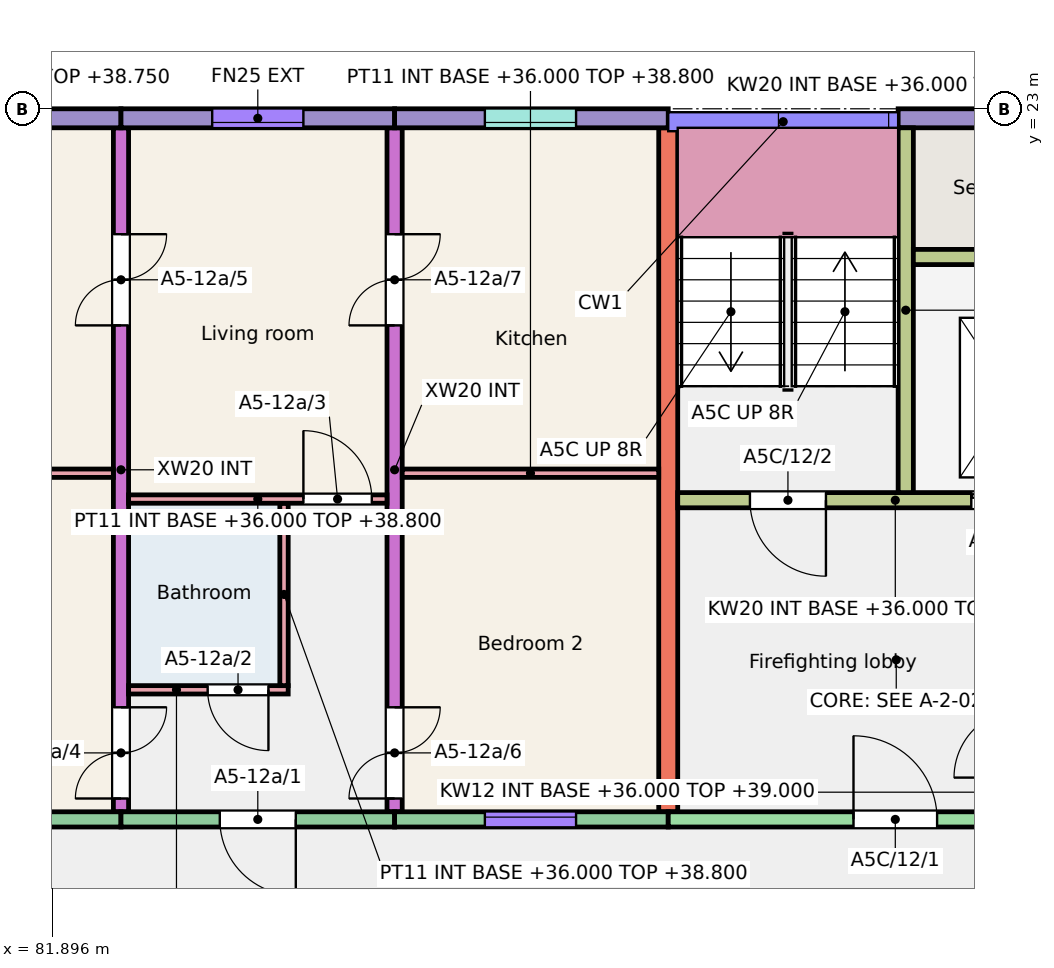
"""IFC4 building model, lengths in metres.
Left out: names, types, materials, properties, quantities, classifications, styles, units other than length and angle.
Written with IfcOpenShell. Run it as: python <this file> out.ifc"""

import sys

from ifc_helpers import new_model, si_unit, direction, frame, frame_2d, origin, place, context, subcontext, project, spatial, rectangle, extrude, element, fill, save


model = new_model("IFC4")
c1 = context("Model", 3, precision=1e-05, world=origin(), true_north=direction((0.0, 1.0)))
c2 = subcontext(c1, "Body", "Model", "MODEL_VIEW")
j1 = project(units=[si_unit("LENGTHUNIT", "METRE"), si_unit("PLANEANGLEUNIT", "RADIAN")], contexts=[c1])
p1 = place(None, origin())
s1 = spatial("IfcSite", under=j1, at=p1, CompositionType="ELEMENT")
p2 = place(p1, origin())
s2 = spatial("IfcBuilding", under=s1, at=p2, CompositionType="ELEMENT")
p3 = place(p2, frame((0.0, 0.0, 36.0)))
s3 = spatial("IfcBuildingStorey", under=s2, at=p3, CompositionType="ELEMENT", Elevation=36.0)
p4 = place(p3, frame((82.8, 13.75, 0.0), z_axis=(0.0, 0.0, 1.0), x_axis=(0.0, 1.0, 0.0)))
e1 = element("IfcWall", 1, at=p4, inside=s3, PredefinedType="SHEAR", context=c2, shape_type="SweptSolid", body=[
    extrude(rectangle(XDim=9.0, YDim=0.2, at=frame_2d((4.5, 0.0))), origin(), (0.0, 0.0, 1.0), 3.0),
])
p5 = place(p4, frame((0.175, 0.0, 0.0)))
e2 = element("IfcOpeningElement", 2, at=p5, cuts=e1, PredefinedType="OPENING", context=c2, shape_type="SweptSolid", body=[
    extrude(rectangle(XDim=1.2, YDim=2.1, at=frame_2d((0.6, 1.05))), frame((0.0, 0.11, 0.0), z_axis=(0.0, -1.0, 0.0), x_axis=(1.0, 0.0, 0.0)), (0.0, 0.0, 1.0), 0.22),
])
p6 = place(p4, frame((6.4, 0.0, 0.0)))
e3 = element("IfcOpeningElement", 3, at=p6, cuts=e1, PredefinedType="OPENING", context=c2, shape_type="SweptSolid", body=[
    extrude(rectangle(XDim=1.2, YDim=2.1, at=frame_2d((0.6, 1.05))), frame((0.0, 0.11, 0.0), z_axis=(0.0, -1.0, 0.0), x_axis=(1.0, 0.0, 0.0)), (0.0, 0.0, 1.0), 0.22),
])
p7 = place(p3, frame((86.4, 13.75, 0.0), z_axis=(0.0, 0.0, 1.0), x_axis=(0.0, 1.0, 0.0)))
e4 = element("IfcWall", 4, at=p7, inside=s3, PredefinedType="SHEAR", context=c2, shape_type="SweptSolid", body=[
    extrude(rectangle(XDim=9.0, YDim=0.2, at=frame_2d((4.5, 0.0))), origin(), (0.0, 0.0, 1.0), 3.0),
])
p8 = place(p7, frame((0.175, 0.0, 0.0)))
e5 = element("IfcOpeningElement", 5, at=p8, cuts=e4, PredefinedType="OPENING", context=c2, shape_type="SweptSolid", body=[
    extrude(rectangle(XDim=1.2, YDim=2.1, at=frame_2d((0.6, 1.05))), frame((0.0, 0.11, 0.0), z_axis=(0.0, -1.0, 0.0), x_axis=(1.0, 0.0, 0.0)), (0.0, 0.0, 1.0), 0.22),
])
p9 = place(p7, frame((6.4, 0.0, 0.0)))
e6 = element("IfcOpeningElement", 6, at=p9, cuts=e4, PredefinedType="OPENING", context=c2, shape_type="SweptSolid", body=[
    extrude(rectangle(XDim=1.2, YDim=2.1, at=frame_2d((0.6, 1.05))), frame((0.0, 0.11, 0.0), z_axis=(0.0, -1.0, 0.0), x_axis=(1.0, 0.0, 0.0)), (0.0, 0.0, 1.0), 0.22),
])
p10 = place(p3, frame((90.0, 13.75, 0.0), z_axis=(0.0, 0.0, 1.0), x_axis=(0.0, 1.0, 0.0)))
e7 = element("IfcWall", 7, at=p10, inside=s3, PredefinedType="SHEAR", context=c2, shape_type="SweptSolid", body=[
    extrude(rectangle(XDim=9.0, YDim=0.25, at=frame_2d((4.5, 0.0))), origin(), (0.0, 0.0, 1.0), 3.0),
])
p11 = place(p3, frame((79.2, 22.875, 0.0), z_axis=(0.0, 0.0, 1.0), x_axis=(1.0, 0.0, 0.0)))
e8 = element("IfcWall", 8, at=p11, inside=s3, PredefinedType="SOLIDWALL", context=c2, shape_type="SweptSolid", body=[
    extrude(rectangle(XDim=3.6, YDim=0.25, at=frame_2d((1.8, 0.0))), origin(), (0.0, 0.0, 1.0), 3.0),
])
p12 = place(p11, frame((1.225, 0.0, 0.8)))
e9 = element("IfcOpeningElement", 9, at=p12, cuts=e8, PredefinedType="OPENING", context=c2, shape_type="SweptSolid", body=[
    extrude(rectangle(XDim=1.2, YDim=1.6, at=frame_2d((0.6, 0.8))), frame((0.0, 0.135, 0.0), z_axis=(0.0, -1.0, 0.0), x_axis=(1.0, 0.0, 0.0)), (0.0, 0.0, 1.0), 0.27),
])
p13 = place(p3, frame((79.35, 13.65, 0.0), z_axis=(0.0, 0.0, 1.0), x_axis=(1.0, 0.0, 0.0)))
e10 = element("IfcWall", 10, at=p13, inside=s3, PredefinedType="SOLIDWALL", context=c2, shape_type="SweptSolid", body=[
    extrude(rectangle(XDim=3.45, YDim=0.2, at=frame_2d((1.725, 0.0))), origin(), (0.0, 0.0, 1.0), 3.0),
])
p14 = place(p13, frame((1.075, 0.0, 0.8)))
e11 = element("IfcOpeningElement", 11, at=p14, cuts=e10, PredefinedType="OPENING", context=c2, shape_type="SweptSolid", body=[
    extrude(rectangle(XDim=1.2, YDim=1.6, at=frame_2d((0.6, 0.8))), frame((0.0, 0.11, 0.0), z_axis=(0.0, -1.0, 0.0), x_axis=(1.0, 0.0, 0.0)), (0.0, 0.0, 1.0), 0.22),
])
p15 = place(p3, frame((82.8, 22.875, 0.0), z_axis=(0.0, 0.0, 1.0), x_axis=(1.0, 0.0, 0.0)))
e12 = element("IfcWall", 12, at=p15, inside=s3, PredefinedType="SOLIDWALL", context=c2, shape_type="SweptSolid", body=[
    extrude(rectangle(XDim=3.6, YDim=0.25, at=frame_2d((1.8, 0.0))), origin(), (0.0, 0.0, 1.0), 3.0),
])
p16 = place(p15, frame((1.2, 0.0, 0.8)))
e13 = element("IfcOpeningElement", 13, at=p16, cuts=e12, PredefinedType="OPENING", context=c2, shape_type="SweptSolid", body=[
    extrude(rectangle(XDim=1.2, YDim=1.6, at=frame_2d((0.6, 0.8))), frame((0.0, 0.135, 0.0), z_axis=(0.0, -1.0, 0.0), x_axis=(1.0, 0.0, 0.0)), (0.0, 0.0, 1.0), 0.27),
])
p17 = place(p3, frame((82.8, 13.65, 0.0), z_axis=(0.0, 0.0, 1.0), x_axis=(1.0, 0.0, 0.0)))
e14 = element("IfcWall", 14, at=p17, inside=s3, PredefinedType="SOLIDWALL", context=c2, shape_type="SweptSolid", body=[
    extrude(rectangle(XDim=3.6, YDim=0.2, at=frame_2d((1.8, 0.0))), origin(), (0.0, 0.0, 1.0), 3.0),
])
p18 = place(p17, frame((1.3, 0.0, 0.0)))
e15 = element("IfcOpeningElement", 15, at=p18, cuts=e14, PredefinedType="OPENING", context=c2, shape_type="SweptSolid", body=[
    extrude(rectangle(XDim=1.0, YDim=2.1, at=frame_2d((0.5, 1.05))), frame((0.0, 0.11, 0.0), z_axis=(0.0, -1.0, 0.0), x_axis=(1.0, 0.0, 0.0)), (0.0, 0.0, 1.0), 0.22),
])
p19 = place(p3, frame((86.4, 22.875, 0.0), z_axis=(0.0, 0.0, 1.0), x_axis=(1.0, 0.0, 0.0)))
e16 = element("IfcWall", 16, at=p19, inside=s3, PredefinedType="SOLIDWALL", context=c2, shape_type="SweptSolid", body=[
    extrude(rectangle(XDim=3.6, YDim=0.25, at=frame_2d((1.8, 0.0))), origin(), (0.0, 0.0, 1.0), 3.0),
])
p20 = place(p19, frame((1.188, 0.0, 1.1)))
e17 = element("IfcOpeningElement", 17, at=p20, cuts=e16, PredefinedType="OPENING", context=c2, shape_type="SweptSolid", body=[
    extrude(rectangle(XDim=1.2, YDim=1.3, at=frame_2d((0.6, 0.65))), frame((0.0, 0.135, 0.0), z_axis=(0.0, -1.0, 0.0), x_axis=(1.0, 0.0, 0.0)), (0.0, 0.0, 1.0), 0.27),
])
p21 = place(p3, frame((86.4, 13.65, 0.0), z_axis=(0.0, 0.0, 1.0), x_axis=(1.0, 0.0, 0.0)))
e18 = element("IfcWall", 18, at=p21, inside=s3, PredefinedType="SOLIDWALL", context=c2, shape_type="SweptSolid", body=[
    extrude(rectangle(XDim=3.6, YDim=0.2, at=frame_2d((1.8, 0.0))), origin(), (0.0, 0.0, 1.0), 3.0),
])
p22 = place(p21, frame((1.188, 0.0, 0.8)))
e19 = element("IfcOpeningElement", 19, at=p22, cuts=e18, PredefinedType="OPENING", context=c2, shape_type="SweptSolid", body=[
    extrude(rectangle(XDim=1.2, YDim=1.6, at=frame_2d((0.6, 0.8))), frame((0.0, 0.11, 0.0), z_axis=(0.0, -1.0, 0.0), x_axis=(1.0, 0.0, 0.0)), (0.0, 0.0, 1.0), 0.22),
])
p23 = place(p3, frame((93.025, 22.875, 0.0), z_axis=(0.0, 0.0, 1.0), x_axis=(1.0, 0.0, 0.0)))
e20 = element("IfcWall", 20, at=p23, inside=s3, PredefinedType="SOLIDWALL", context=c2, shape_type="SweptSolid", body=[
    extrude(rectangle(XDim=2.975, YDim=0.25, at=frame_2d((1.488, 0.0))), origin(), (0.0, 0.0, 1.0), 3.0),
])
p24 = place(p3, frame((90.0, 13.65, 0.0), z_axis=(0.0, 0.0, 1.0), x_axis=(1.0, 0.0, 0.0)))
e21 = element("IfcWall", 21, at=p24, inside=s3, PredefinedType="SHEAR", context=c2, shape_type="SweptSolid", body=[
    extrude(rectangle(XDim=5.85, YDim=0.2, at=frame_2d((2.925, 0.0))), origin(), (0.0, 0.0, 1.0), 3.0),
])
p25 = place(p24, frame((2.438, 0.0, 0.0)))
e22 = element("IfcOpeningElement", 22, at=p25, cuts=e21, PredefinedType="OPENING", context=c2, shape_type="SweptSolid", body=[
    extrude(rectangle(XDim=1.1, YDim=2.1, at=frame_2d((0.55, 1.05))), frame((0.0, 0.11, 0.0), z_axis=(0.0, -1.0, 0.0), x_axis=(1.0, 0.0, 0.0)), (0.0, 0.0, 1.0), 0.22),
])
p26 = place(p3, frame((90.125, 17.85, 0.0), z_axis=(0.0, 0.0, 1.0), x_axis=(1.0, 0.0, 0.0)))
e23 = element("IfcWall", 23, at=p26, inside=s3, PredefinedType="SHEAR", context=c2, shape_type="SweptSolid", body=[
    extrude(rectangle(XDim=5.725, YDim=0.2, at=frame_2d((2.863, 0.0))), origin(), (0.0, 0.0, 1.0), 3.0),
])
p27 = place(p26, frame((0.95, 0.0, 0.0)))
e24 = element("IfcOpeningElement", 24, at=p27, cuts=e23, PredefinedType="OPENING", context=c2, shape_type="SweptSolid", body=[
    extrude(rectangle(XDim=1.0, YDim=2.1, at=frame_2d((0.5, 1.05))), frame((0.0, 0.11, 0.0), z_axis=(0.0, -1.0, 0.0), x_axis=(1.0, 0.0, 0.0)), (0.0, 0.0, 1.0), 0.22),
])
p28 = place(p26, frame((3.863, 0.0, 0.0)))
e25 = element("IfcOpeningElement", 25, at=p28, cuts=e23, PredefinedType="OPENING", context=c2, shape_type="SweptSolid", body=[
    extrude(rectangle(XDim=1.1, YDim=2.1, at=frame_2d((0.55, 1.05))), frame((0.0, 0.11, 0.0), z_axis=(0.0, -1.0, 0.0), x_axis=(1.0, 0.0, 0.0)), (0.0, 0.0, 1.0), 0.22),
])
p29 = place(p3, frame((93.125, 17.95, 0.0), z_axis=(0.0, 0.0, 1.0), x_axis=(0.0, 1.0, 0.0)))
e26 = element("IfcWall", 26, at=p29, inside=s3, PredefinedType="SHEAR", context=c2, shape_type="SweptSolid", body=[
    extrude(rectangle(XDim=4.8, YDim=0.2, at=frame_2d((2.4, 0.0))), origin(), (0.0, 0.0, 1.0), 3.0),
])
p30 = place(p3, frame((93.225, 21.05, 0.0), z_axis=(0.0, 0.0, 1.0), x_axis=(1.0, 0.0, 0.0)))
e27 = element("IfcWall", 27, at=p30, inside=s3, PredefinedType="SHEAR", context=c2, shape_type="SweptSolid", body=[
    extrude(rectangle(XDim=2.625, YDim=0.2, at=frame_2d((1.312, 0.0))), origin(), (0.0, 0.0, 1.0), 3.0),
])
p31 = place(p3, frame((82.9, 15.355, 0.0), z_axis=(0.0, 0.0, 1.0), x_axis=(1.0, 0.0, 0.0)))
e28 = element("IfcWall", 28, at=p31, inside=s3, PredefinedType="PARTITIONING", context=c2, shape_type="SweptSolid", body=[
    extrude(rectangle(XDim=2.1, YDim=0.11, at=frame_2d((1.05, 0.0))), origin(), (0.0, 0.0, 1.0), 2.8),
])
p32 = place(p31, frame((1.04, 0.0, 0.0)))
e29 = element("IfcOpeningElement", 29, at=p32, cuts=e28, PredefinedType="OPENING", context=c2, shape_type="SweptSolid", body=[
    extrude(rectangle(XDim=0.8, YDim=2.1, at=frame_2d((0.4, 1.05))), frame((0.0, 0.065, 0.0), z_axis=(0.0, -1.0, 0.0), x_axis=(1.0, 0.0, 0.0)), (0.0, 0.0, 1.0), 0.13),
])
p33 = place(p3, frame((84.945, 15.41, 0.0), z_axis=(0.0, 0.0, 1.0), x_axis=(0.0, 1.0, 0.0)))
e30 = element("IfcWall", 30, at=p33, inside=s3, PredefinedType="PARTITIONING", context=c2, shape_type="SweptSolid", body=[
    extrude(rectangle(XDim=2.4, YDim=0.11, at=frame_2d((1.2, 0.0))), origin(), (0.0, 0.0, 1.0), 2.8),
])
p34 = place(p3, frame((82.9, 17.865, 0.0), z_axis=(0.0, 0.0, 1.0), x_axis=(1.0, 0.0, 0.0)))
e31 = element("IfcWall", 31, at=p34, inside=s3, PredefinedType="PARTITIONING", context=c2, shape_type="SweptSolid", body=[
    extrude(rectangle(XDim=3.4, YDim=0.11, at=frame_2d((1.7, 0.0))), origin(), (0.0, 0.0, 1.0), 2.8),
])
p35 = place(p34, frame((2.3, 0.0, 0.0)))
e32 = element("IfcOpeningElement", 32, at=p35, cuts=e31, PredefinedType="OPENING", context=c2, shape_type="SweptSolid", body=[
    extrude(rectangle(XDim=0.9, YDim=2.1, at=frame_2d((0.45, 1.05))), frame((0.0, 0.065, 0.0), z_axis=(0.0, -1.0, 0.0), x_axis=(1.0, 0.0, 0.0)), (0.0, 0.0, 1.0), 0.13),
])
p36 = place(p3, frame((79.35, 18.205, 0.0), z_axis=(0.0, 0.0, 1.0), x_axis=(1.0, 0.0, 0.0)))
e33 = element("IfcWall", 33, at=p36, inside=s3, PredefinedType="PARTITIONING", context=c2, shape_type="SweptSolid", body=[
    extrude(rectangle(XDim=3.35, YDim=0.11, at=frame_2d((1.675, 0.0))), origin(), (0.0, 0.0, 1.0), 2.75),
])
p37 = place(p3, frame((86.5, 18.205, 0.0), z_axis=(0.0, 0.0, 1.0), x_axis=(1.0, 0.0, 0.0)))
e34 = element("IfcWall", 34, at=p37, inside=s3, PredefinedType="PARTITIONING", context=c2, shape_type="SweptSolid", body=[
    extrude(rectangle(XDim=3.375, YDim=0.11, at=frame_2d((1.688, 0.0))), origin(), (0.0, 0.0, 1.0), 2.8),
])
p38 = place(p22, origin())
e35 = element("IfcWindow", 35, at=p38, inside=s3, PartitioningType="SINGLE_PANEL", PredefinedType="WINDOW", context=c2, shape_type="SweptSolid", body=[
    extrude(rectangle(XDim=1.2, YDim=1.6, at=frame_2d((0.6, 0.8))), frame((0.0, 0.06, 0.0), z_axis=(0.0, -1.0, 0.0), x_axis=(1.0, 0.0, 0.0)), (0.0, 0.0, 1.0), 0.06),
])
fill(e19, e35)
p39 = place(p20, origin())
e36 = element("IfcWindow", 36, at=p39, inside=s3, PartitioningType="SINGLE_PANEL", PredefinedType="WINDOW", context=c2, shape_type="SweptSolid", body=[
    extrude(rectangle(XDim=1.2, YDim=1.3, at=frame_2d((0.6, 0.65))), frame((0.0, -0.025, 0.0), z_axis=(0.0, -1.0, 0.0), x_axis=(1.0, 0.0, 0.0)), (0.0, 0.0, 1.0), 0.06),
])
fill(e17, e36)
p40 = place(p16, origin())
e37 = element("IfcWindow", 37, at=p40, inside=s3, PartitioningType="SINGLE_PANEL", PredefinedType="WINDOW", context=c2, shape_type="SweptSolid", body=[
    extrude(rectangle(XDim=1.2, YDim=1.6, at=frame_2d((0.6, 0.8))), frame((0.0, -0.025, 0.0), z_axis=(0.0, -1.0, 0.0), x_axis=(1.0, 0.0, 0.0)), (0.0, 0.0, 1.0), 0.06),
])
fill(e13, e37)
p41 = place(p18, origin())
e38 = element("IfcDoor", 38, at=p41, inside=s3, OperationType="SINGLE_SWING_RIGHT", PredefinedType="DOOR", context=c2, shape_type="SweptSolid", body=[
    extrude(rectangle(XDim=1.0, YDim=2.1, at=frame_2d((0.5, 1.05))), frame((0.0, 0.025, 0.0), z_axis=(0.0, -1.0, 0.0), x_axis=(1.0, 0.0, 0.0)), (0.0, 0.0, 1.0), 0.05),
])
fill(e15, e38)
p42 = place(p32, origin())
e39 = element("IfcDoor", 39, at=p42, inside=s3, OperationType="SINGLE_SWING_RIGHT", PredefinedType="DOOR", context=c2, shape_type="SweptSolid", body=[
    extrude(rectangle(XDim=0.8, YDim=2.1, at=frame_2d((0.4, 1.05))), frame((0.0, 0.025, 0.0), z_axis=(0.0, -1.0, 0.0), x_axis=(1.0, 0.0, 0.0)), (0.0, 0.0, 1.0), 0.05),
])
fill(e29, e39)
p43 = place(p35, origin())
e40 = element("IfcDoor", 40, at=p43, inside=s3, OperationType="SINGLE_SWING_LEFT", PredefinedType="DOOR", context=c2, shape_type="SweptSolid", body=[
    extrude(rectangle(XDim=0.9, YDim=2.1, at=frame_2d((0.45, 1.05))), frame((0.0, 0.025, 0.0), z_axis=(0.0, -1.0, 0.0), x_axis=(1.0, 0.0, 0.0)), (0.0, 0.0, 1.0), 0.05),
])
fill(e32, e40)
p44 = place(p5, origin())
e41 = element("IfcDoor", 41, at=p44, inside=s3, OperationType="DOUBLE_DOOR_SINGLE_SWING", PredefinedType="DOOR", context=c2, shape_type="SweptSolid", body=[
    extrude(rectangle(XDim=1.2, YDim=2.1, at=frame_2d((0.6, 1.05))), frame((0.0, 0.025, 0.0), z_axis=(0.0, -1.0, 0.0), x_axis=(1.0, 0.0, 0.0)), (0.0, 0.0, 1.0), 0.05),
])
fill(e2, e41)
p45 = place(p6, origin())
e42 = element("IfcDoor", 42, at=p45, inside=s3, OperationType="DOUBLE_DOOR_SINGLE_SWING", PredefinedType="DOOR", context=c2, shape_type="SweptSolid", body=[
    extrude(rectangle(XDim=1.2, YDim=2.1, at=frame_2d((0.6, 1.05))), frame((0.0, 0.025, 0.0), z_axis=(0.0, -1.0, 0.0), x_axis=(1.0, 0.0, 0.0)), (0.0, 0.0, 1.0), 0.05),
])
fill(e3, e42)
p46 = place(p8, origin())
e43 = element("IfcDoor", 43, at=p46, inside=s3, OperationType="DOUBLE_DOOR_SINGLE_SWING", PredefinedType="DOOR", context=c2, shape_type="SweptSolid", body=[
    extrude(rectangle(XDim=1.2, YDim=2.1, at=frame_2d((0.6, 1.05))), frame((0.0, 0.025, 0.0), z_axis=(0.0, -1.0, 0.0), x_axis=(1.0, 0.0, 0.0)), (0.0, 0.0, 1.0), 0.05),
])
fill(e5, e43)
p47 = place(p9, origin())
e44 = element("IfcDoor", 44, at=p47, inside=s3, OperationType="DOUBLE_DOOR_SINGLE_SWING", PredefinedType="DOOR", context=c2, shape_type="SweptSolid", body=[
    extrude(rectangle(XDim=1.2, YDim=2.1, at=frame_2d((0.6, 1.05))), frame((0.0, 0.025, 0.0), z_axis=(0.0, -1.0, 0.0), x_axis=(1.0, 0.0, 0.0)), (0.0, 0.0, 1.0), 0.05),
])
fill(e6, e44)
p48 = place(p25, origin())
e45 = element("IfcDoor", 45, at=p48, inside=s3, OperationType="SINGLE_SWING_LEFT", PredefinedType="DOOR", context=c2, shape_type="SweptSolid", body=[
    extrude(rectangle(XDim=1.1, YDim=2.1, at=frame_2d((0.55, 1.05))), frame((0.0, 0.025, 0.0), z_axis=(0.0, -1.0, 0.0), x_axis=(1.0, 0.0, 0.0)), (0.0, 0.0, 1.0), 0.05),
])
fill(e22, e45)
p49 = place(p27, origin())
e46 = element("IfcDoor", 46, at=p49, inside=s3, OperationType="SINGLE_SWING_RIGHT", PredefinedType="DOOR", context=c2, shape_type="SweptSolid", body=[
    extrude(rectangle(XDim=1.0, YDim=2.1, at=frame_2d((0.5, 1.05))), frame((0.0, 0.025, 0.0), z_axis=(0.0, -1.0, 0.0), x_axis=(1.0, 0.0, 0.0)), (0.0, 0.0, 1.0), 0.05),
])
fill(e24, e46)
p50 = place(p28, origin())
e47 = element("IfcDoor", 47, at=p50, inside=s3, OperationType="DOUBLE_DOOR_SLIDING", PredefinedType="DOOR", context=c2, shape_type="SweptSolid", body=[
    extrude(rectangle(XDim=1.1, YDim=2.1, at=frame_2d((0.55, 1.05))), frame((0.0, 0.025, 0.0), z_axis=(0.0, -1.0, 0.0), x_axis=(1.0, 0.0, 0.0)), (0.0, 0.0, 1.0), 0.05),
])
fill(e25, e47)
save(model, sys.argv[1])
